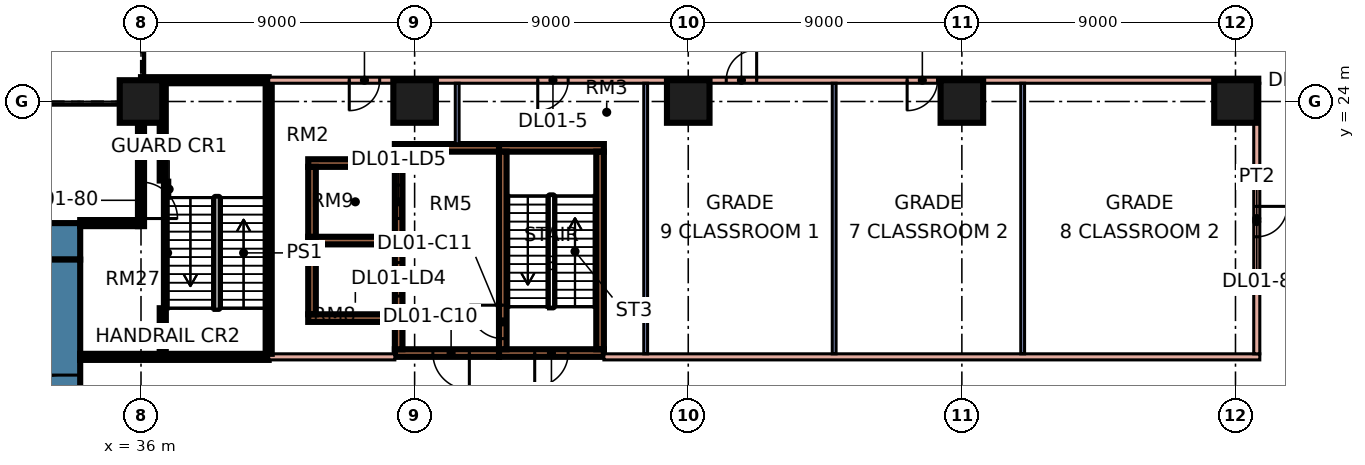
"""IFC4 building model, lengths in metres.
Left out: names, types, materials, properties, quantities, classifications, styles, units other than length and angle.
Written with IfcOpenShell. Run it as: python <this file> out.ifc"""

import sys

from ifc_helpers import new_model, si_unit, direction, frame, frame_2d, origin, origin_2d, place, context, subcontext, project, spatial, rectangle, extrude, element, fill, save


model = new_model("IFC4")
c1 = context("Model", 3, precision=1e-05, world=origin(), true_north=direction((0.0, 1.0)))
c2 = subcontext(c1, "Body", "Model", "MODEL_VIEW")
j1 = project(units=[si_unit("LENGTHUNIT", "METRE"), si_unit("PLANEANGLEUNIT", "RADIAN")], contexts=[c1])
p1 = place(None, origin())
s1 = spatial("IfcSite", under=j1, at=p1, CompositionType="ELEMENT")
p2 = place(p1, origin())
s2 = spatial("IfcBuilding", under=s1, at=p2, CompositionType="ELEMENT")
p3 = place(p2, frame((0.0, 0.0, 7.2)))
s3 = spatial("IfcBuildingStorey", under=s2, at=p3, CompositionType="ELEMENT", Elevation=7.2)
for number, where, z_axis, x_axis in (
    (1, (36.0, 24.0, 0.0), (0.0, 0.0, 1.0), (1.0, 0.0, 0.0)),
    (2, (45.0, 24.0, 0.0), (0.0, 0.0, 1.0), (1.0, 0.0, 0.0)),
    (3, (54.0, 24.0, 0.0), (0.0, 0.0, 1.0), (1.0, 0.0, 0.0)),
    (4, (63.0, 24.0, 0.0), (0.0, 0.0, 1.0), (1.0, 0.0, 0.0)),
    (5, (72.0, 24.0, 0.0), (0.0, 0.0, 1.0), (1.0, 0.0, 0.0)),
):
    element("IfcColumn", number, at=place(p3, frame(where, z_axis=z_axis, x_axis=x_axis)), inside=s3, PredefinedType="COLUMN", context=c2, shape_type="SweptSolid", body=[
        extrude(rectangle(XDim=1.4, YDim=1.4, at=origin_2d()), origin(), (0.0, 0.0, 1.0), 4.8),
    ])
p4 = place(p3, frame((9.0, 19.4, 0.0), z_axis=(0.0, 0.0, 1.0), x_axis=(1.0, 0.0, 0.0)))
e6 = element("IfcWall", 6, at=p4, inside=s3, PredefinedType="SHEAR", context=c2, shape_type="SweptSolid", body=[
    extrude(rectangle(XDim=25.0, YDim=1.2, at=frame_2d((12.5, 0.0))), origin(), (0.0, 0.0, 1.0), 4.8),
])
p5 = place(p4, frame((19.1, 0.0, 0.0)))
e7 = element("IfcOpeningElement", 7, at=p5, cuts=e6, PredefinedType="OPENING", context=c2, shape_type="SweptSolid", body=[
    extrude(rectangle(XDim=1.8, YDim=2.4, at=frame_2d((0.9, 1.2))), frame((0.0, 0.61, 0.0), z_axis=(0.0, -1.0, 0.0), x_axis=(1.0, 0.0, 0.0)), (0.0, 0.0, 1.0), 1.22),
])
p6 = place(p3, frame((33.4, 8.2, 0.0), z_axis=(0.0, 0.0, 1.0), x_axis=(0.0, 1.0, 0.0)))
e8 = element("IfcWall", 8, at=p6, inside=s3, PredefinedType="SHEAR", context=c2, shape_type="SweptSolid", body=[
    extrude(rectangle(XDim=10.6, YDim=1.2, at=frame_2d((5.3, 0.0))), origin(), (0.0, 0.0, 1.0), 4.8),
])
p7 = place(p6, frame((5.0, 0.0, 0.0)))
e9 = element("IfcOpeningElement", 9, at=p7, cuts=e8, PredefinedType="OPENING", context=c2, shape_type="SweptSolid", body=[
    extrude(rectangle(XDim=1.8, YDim=2.4, at=frame_2d((0.9, 1.2))), frame((0.0, 0.61, 0.0), z_axis=(0.0, -1.0, 0.0), x_axis=(1.0, 0.0, 0.0)), (0.0, 0.0, 1.0), 1.22),
])
p8 = place(p3, frame((47.775, 15.725, 0.0), z_axis=(0.0, 0.0, 1.0), x_axis=(1.0, 0.0, 0.0)))
e10 = element("IfcWall", 10, at=p8, inside=s3, PredefinedType="SHEAR", context=c2, shape_type="SweptSolid", body=[
    extrude(rectangle(XDim=3.45, YDim=0.25, at=frame_2d((1.725, 0.0))), origin(), (0.0, 0.0, 1.0), 4.8),
])
p9 = place(p8, frame((1.175, 0.0, 0.0)))
e11 = element("IfcOpeningElement", 11, at=p9, cuts=e10, PredefinedType="OPENING", context=c2, shape_type="SweptSolid", body=[
    extrude(rectangle(XDim=1.1, YDim=2.2, at=frame_2d((0.55, 1.1))), frame((0.0, 0.135, 0.0), z_axis=(0.0, -1.0, 0.0), x_axis=(1.0, 0.0, 0.0)), (0.0, 0.0, 1.0), 0.27),
])
p10 = place(p3, frame((47.775, 22.475, 0.0), z_axis=(0.0, 0.0, 1.0), x_axis=(1.0, 0.0, 0.0)))
e12 = element("IfcWall", 12, at=p10, inside=s3, PredefinedType="SHEAR", context=c2, shape_type="SweptSolid", body=[
    extrude(rectangle(XDim=3.45, YDim=0.25, at=frame_2d((1.725, 0.0))), origin(), (0.0, 0.0, 1.0), 4.8),
])
p11 = place(p3, frame((47.9, 15.85, 0.0), z_axis=(0.0, 0.0, 1.0), x_axis=(0.0, 1.0, 0.0)))
e13 = element("IfcWall", 13, at=p11, inside=s3, PredefinedType="SHEAR", context=c2, shape_type="SweptSolid", body=[
    extrude(rectangle(XDim=6.5, YDim=0.25, at=frame_2d((3.25, 0.0))), origin(), (0.0, 0.0, 1.0), 4.8),
])
p12 = place(p11, frame((0.35, 0.0, 0.0)))
e14 = element("IfcOpeningElement", 14, at=p12, cuts=e13, PredefinedType="OPENING", context=c2, shape_type="SweptSolid", body=[
    extrude(rectangle(XDim=1.1, YDim=2.2, at=frame_2d((0.55, 1.1))), frame((0.0, 0.135, 0.0), z_axis=(0.0, -1.0, 0.0), x_axis=(1.0, 0.0, 0.0)), (0.0, 0.0, 1.0), 0.27),
])
p13 = place(p3, frame((51.1, 15.85, 0.0), z_axis=(0.0, 0.0, 1.0), x_axis=(0.0, 1.0, 0.0)))
e15 = element("IfcWall", 15, at=p13, inside=s3, PredefinedType="SHEAR", context=c2, shape_type="SweptSolid", body=[
    extrude(rectangle(XDim=6.5, YDim=0.25, at=frame_2d((3.25, 0.0))), origin(), (0.0, 0.0, 1.0), 4.8),
])
p14 = place(p3, frame((44.35, 15.725, 0.0), z_axis=(0.0, 0.0, 1.0), x_axis=(1.0, 0.0, 0.0)))
e16 = element("IfcWall", 16, at=p14, inside=s3, PredefinedType="SHEAR", context=c2, shape_type="SweptSolid", body=[
    extrude(rectangle(XDim=3.425, YDim=0.25, at=frame_2d((1.712, 0.0))), origin(), (0.0, 0.0, 1.0), 4.8),
])
p15 = place(p14, frame((1.25, 0.0, 0.0)))
e17 = element("IfcOpeningElement", 17, at=p15, cuts=e16, PredefinedType="OPENING", context=c2, shape_type="SweptSolid", body=[
    extrude(rectangle(XDim=1.2, YDim=2.2, at=frame_2d((0.6, 1.1))), frame((0.0, 0.135, 0.0), z_axis=(0.0, -1.0, 0.0), x_axis=(1.0, 0.0, 0.0)), (0.0, 0.0, 1.0), 0.27),
])
p16 = place(p3, frame((44.35, 22.475, 0.0), z_axis=(0.0, 0.0, 1.0), x_axis=(1.0, 0.0, 0.0)))
e18 = element("IfcWall", 18, at=p16, inside=s3, PredefinedType="SHEAR", context=c2, shape_type="SweptSolid", body=[
    extrude(rectangle(XDim=3.425, YDim=0.25, at=frame_2d((1.712, 0.0))), origin(), (0.0, 0.0, 1.0), 4.8),
])
p17 = place(p3, frame((44.475, 15.85, 0.0), z_axis=(0.0, 0.0, 1.0), x_axis=(0.0, 1.0, 0.0)))
e19 = element("IfcWall", 19, at=p17, inside=s3, PredefinedType="SHEAR", context=c2, shape_type="SweptSolid", body=[
    extrude(rectangle(XDim=6.5, YDim=0.25, at=frame_2d((3.25, 0.0))), origin(), (0.0, 0.0, 1.0), 4.8),
])
p18 = place(p17, frame((1.75, 0.0, 0.0)))
e20 = element("IfcOpeningElement", 20, at=p18, cuts=e19, PredefinedType="OPENING", context=c2, shape_type="SweptSolid", body=[
    extrude(rectangle(XDim=1.1, YDim=2.2, at=frame_2d((0.55, 1.1))), frame((0.0, 0.135, 0.0), z_axis=(0.0, -1.0, 0.0), x_axis=(1.0, 0.0, 0.0)), (0.0, 0.0, 1.0), 0.27),
])
p19 = place(p17, frame((4.3, 0.0, 0.0)))
e21 = element("IfcOpeningElement", 21, at=p19, cuts=e19, PredefinedType="OPENING", context=c2, shape_type="SweptSolid", body=[
    extrude(rectangle(XDim=1.1, YDim=2.2, at=frame_2d((0.55, 1.1))), frame((0.0, 0.135, 0.0), z_axis=(0.0, -1.0, 0.0), x_axis=(1.0, 0.0, 0.0)), (0.0, 0.0, 1.0), 0.27),
])
for number, where, z_axis, x_axis in (
    (22, (41.5, 16.875, 0.0), (0.0, 0.0, 1.0), (1.0, 0.0, 0.0)),
    (23, (41.5, 19.425, 0.0), (0.0, 0.0, 1.0), (1.0, 0.0, 0.0)),
    (24, (41.5, 21.975, 0.0), (0.0, 0.0, 1.0), (1.0, 0.0, 0.0)),
):
    element("IfcWall", number, at=place(p3, frame(where, z_axis=z_axis, x_axis=x_axis)), inside=s3, PredefinedType="SHEAR", context=c2, shape_type="SweptSolid", body=[
        extrude(rectangle(XDim=2.85, YDim=0.25, at=frame_2d((1.425, 0.0))), origin(), (0.0, 0.0, 1.0), 4.8),
    ])
for number, where, z_axis, x_axis in (
    (25, (41.625, 17.0, 0.0), (0.0, 0.0, 1.0), (0.0, 1.0, 0.0)),
    (26, (41.625, 19.55, 0.0), (0.0, 0.0, 1.0), (0.0, 1.0, 0.0)),
):
    element("IfcWall", number, at=place(p3, frame(where, z_axis=z_axis, x_axis=x_axis)), inside=s3, PredefinedType="SHEAR", context=c2, shape_type="SweptSolid", body=[
        extrude(rectangle(XDim=2.3, YDim=0.25, at=frame_2d((1.15, 0.0))), origin(), (0.0, 0.0, 1.0), 4.8),
    ])
p20 = place(p3, frame((34.0, 15.6, 0.0), z_axis=(0.0, 0.0, 1.0), x_axis=(1.0, 0.0, 0.0)))
e27 = element("IfcWall", 27, at=p20, inside=s3, PredefinedType="SOLIDWALL", context=c2, shape_type="SweptSolid", body=[
    extrude(rectangle(XDim=6.2, YDim=0.2, at=frame_2d((3.1, 0.0))), origin(), (0.0, 0.0, 1.0), 4.4),
])
p21 = place(p3, frame((34.0, 20.0, 0.0), z_axis=(0.0, 0.0, 1.0), x_axis=(1.0, 0.0, 0.0)))
e28 = element("IfcWall", 28, at=p21, inside=s3, PredefinedType="SOLIDWALL", context=c2, shape_type="SweptSolid", body=[
    extrude(rectangle(XDim=1.9, YDim=0.2, at=frame_2d((0.95, 0.0))), origin(), (0.0, 0.0, 1.0), 4.4),
])
p22 = place(p3, frame((36.0, 19.9, 0.0), z_axis=(0.0, 0.0, 1.0), x_axis=(0.0, 1.0, 0.0)))
e29 = element("IfcWall", 29, at=p22, inside=s3, PredefinedType="SOLIDWALL", context=c2, shape_type="SweptSolid", body=[
    extrude(rectangle(XDim=4.1, YDim=0.2, at=frame_2d((2.05, 0.0))), origin(), (0.0, 0.0, 1.0), 4.4),
])
p23 = place(p22, frame((0.25, 0.0, 0.0)))
e30 = element("IfcOpeningElement", 30, at=p23, cuts=e29, PredefinedType="OPENING", context=c2, shape_type="SweptSolid", body=[
    extrude(rectangle(XDim=1.2, YDim=2.1, at=frame_2d((0.6, 1.05))), frame((0.0, 0.11, 0.0), z_axis=(0.0, -1.0, 0.0), x_axis=(1.0, 0.0, 0.0)), (0.0, 0.0, 1.0), 0.22),
])
p24 = place(p3, frame((36.0, 24.7, 0.0), z_axis=(0.0, 0.0, 1.0), x_axis=(1.0, 0.0, 0.0)))
e31 = element("IfcWall", 31, at=p24, inside=s3, PredefinedType="SOLIDWALL", context=c2, shape_type="SweptSolid", body=[
    extrude(rectangle(XDim=4.2, YDim=0.2, at=frame_2d((2.1, 0.0))), origin(), (0.0, 0.0, 1.0), 4.4),
])
p25 = place(p3, frame((40.2, 15.6, 0.0), z_axis=(0.0, 0.0, 1.0), x_axis=(1.0, 0.0, 0.0)))
e32 = element("IfcWall", 32, at=p25, inside=s3, PredefinedType="PARTITIONING", context=c2, shape_type="SweptSolid", body=[
    extrude(rectangle(XDim=4.15, YDim=0.2, at=frame_2d((2.075, 0.0))), origin(), (0.0, 0.0, 1.0), 4.4),
])
p26 = place(p3, frame((40.2, 15.7, 0.0), z_axis=(0.0, 0.0, 1.0), x_axis=(0.0, 1.0, 0.0)))
e33 = element("IfcWall", 33, at=p26, inside=s3, PredefinedType="SOLIDWALL", context=c2, shape_type="SweptSolid", body=[
    extrude(rectangle(XDim=8.9, YDim=0.2, at=frame_2d((4.45, 0.0))), origin(), (0.0, 0.0, 1.0), 4.4),
])
p27 = place(p3, frame((40.2, 24.7, 0.0), z_axis=(0.0, 0.0, 1.0), x_axis=(1.0, 0.0, 0.0)))
e34 = element("IfcWall", 34, at=p27, inside=s3, PredefinedType="PARTITIONING", context=c2, shape_type="SweptSolid", body=[
    extrude(rectangle(XDim=32.6, YDim=0.2, at=frame_2d((16.3, 0.0))), origin(), (0.0, 0.0, 1.0), 4.4),
])
p28 = place(p27, frame((2.65, 0.0, 0.0)))
e35 = element("IfcOpeningElement", 35, at=p28, cuts=e34, PredefinedType="OPENING", context=c2, shape_type="SweptSolid", body=[
    extrude(rectangle(XDim=1.0, YDim=2.1, at=frame_2d((0.5, 1.05))), frame((0.0, 0.11, 0.0), z_axis=(0.0, -1.0, 0.0), x_axis=(1.0, 0.0, 0.0)), (0.0, 0.0, 1.0), 0.22),
])
p29 = place(p27, frame((8.85, 0.0, 0.0)))
e36 = element("IfcOpeningElement", 36, at=p29, cuts=e34, PredefinedType="OPENING", context=c2, shape_type="SweptSolid", body=[
    extrude(rectangle(XDim=1.0, YDim=2.1, at=frame_2d((0.5, 1.05))), frame((0.0, 0.11, 0.0), z_axis=(0.0, -1.0, 0.0), x_axis=(1.0, 0.0, 0.0)), (0.0, 0.0, 1.0), 0.22),
])
p30 = place(p27, frame((15.05, 0.0, 0.0)))
e37 = element("IfcOpeningElement", 37, at=p30, cuts=e34, PredefinedType="OPENING", context=c2, shape_type="SweptSolid", body=[
    extrude(rectangle(XDim=1.0, YDim=2.1, at=frame_2d((0.5, 1.05))), frame((0.0, 0.11, 0.0), z_axis=(0.0, -1.0, 0.0), x_axis=(1.0, 0.0, 0.0)), (0.0, 0.0, 1.0), 0.22),
])
p31 = place(p27, frame((21.0, 0.0, 0.0)))
e38 = element("IfcOpeningElement", 38, at=p31, cuts=e34, PredefinedType="OPENING", context=c2, shape_type="SweptSolid", body=[
    extrude(rectangle(XDim=1.0, YDim=2.1, at=frame_2d((0.5, 1.05))), frame((0.0, 0.11, 0.0), z_axis=(0.0, -1.0, 0.0), x_axis=(1.0, 0.0, 0.0)), (0.0, 0.0, 1.0), 0.22),
])
p32 = place(p3, frame((46.4, 22.6, 0.0), z_axis=(0.0, 0.0, 1.0), x_axis=(0.0, 1.0, 0.0)))
e39 = element("IfcWall", 39, at=p32, inside=s3, PredefinedType="PARTITIONING", context=c2, shape_type="SweptSolid", body=[
    extrude(rectangle(XDim=2.0, YDim=0.125, at=frame_2d((1.0, 0.0))), origin(), (0.0, 0.0, 1.0), 4.4),
])
p33 = place(p3, frame((51.225, 15.6, 0.0), z_axis=(0.0, 0.0, 1.0), x_axis=(1.0, 0.0, 0.0)))
e40 = element("IfcWall", 40, at=p33, inside=s3, PredefinedType="PARTITIONING", context=c2, shape_type="SweptSolid", body=[
    extrude(rectangle(XDim=21.575, YDim=0.2, at=frame_2d((10.788, 0.0))), origin(), (0.0, 0.0, 1.0), 4.4),
])
for number, where, z_axis, x_axis in (
    (41, (52.6, 15.7, 0.0), (0.0, 0.0, 1.0), (0.0, 1.0, 0.0)),
    (42, (58.8, 15.7, 0.0), (0.0, 0.0, 1.0), (0.0, 1.0, 0.0)),
    (43, (65.0, 15.7, 0.0), (0.0, 0.0, 1.0), (0.0, 1.0, 0.0)),
):
    element("IfcWall", number, at=place(p3, frame(where, z_axis=z_axis, x_axis=x_axis)), inside=s3, PredefinedType="PARTITIONING", context=c2, shape_type="SweptSolid", body=[
        extrude(rectangle(XDim=8.9, YDim=0.125, at=frame_2d((4.45, 0.0))), origin(), (0.0, 0.0, 1.0), 4.4),
    ])
p34 = place(p3, frame((72.7, 15.7, 0.0), z_axis=(0.0, 0.0, 1.0), x_axis=(0.0, 1.0, 0.0)))
e44 = element("IfcWall", 44, at=p34, inside=s3, PredefinedType="PARTITIONING", context=c2, shape_type="SweptSolid", body=[
    extrude(rectangle(XDim=8.9, YDim=0.2, at=frame_2d((4.45, 0.0))), origin(), (0.0, 0.0, 1.0), 4.4),
])
p35 = place(p34, frame((3.85, 0.0, 0.0)))
e45 = element("IfcOpeningElement", 45, at=p35, cuts=e44, PredefinedType="OPENING", context=c2, shape_type="SweptSolid", body=[
    extrude(rectangle(XDim=1.0, YDim=2.1, at=frame_2d((0.5, 1.05))), frame((0.0, 0.11, 0.0), z_axis=(0.0, -1.0, 0.0), x_axis=(1.0, 0.0, 0.0)), (0.0, 0.0, 1.0), 0.22),
])
p36 = place(p3, frame((36.715, 21.4, 0.0), z_axis=(0.0, 0.0, 1.0), x_axis=(0.0, 1.0, 0.0)))
e46 = element("IfcWall", 46, at=p36, inside=s3, PredefinedType="SOLIDWALL", context=c2, shape_type="SweptSolid", body=[
    extrude(rectangle(XDim=3.2, YDim=0.2, at=frame_2d((1.6, 0.0))), origin(), (0.0, 0.0, 1.0), 4.4),
])
p37 = place(p3, frame((36.715, 15.7, 0.0), z_axis=(0.0, 0.0, 1.0), x_axis=(0.0, 1.0, 0.0)))
e47 = element("IfcWall", 47, at=p37, inside=s3, PredefinedType="SOLIDWALL", context=c2, shape_type="SweptSolid", body=[
    extrude(rectangle(XDim=1.5, YDim=0.2, at=frame_2d((0.75, 0.0))), origin(), (0.0, 0.0, 1.0), 4.4),
])
p38 = place(p7, origin())
e48 = element("IfcDoor", 48, at=p38, inside=s3, OperationType="DOUBLE_DOOR_SINGLE_SWING", PredefinedType="DOOR", context=c2, shape_type="SweptSolid", body=[
    extrude(rectangle(XDim=1.8, YDim=2.4, at=frame_2d((0.9, 1.2))), frame((0.0, 0.025, 0.0), z_axis=(0.0, -1.0, 0.0), x_axis=(1.0, 0.0, 0.0)), (0.0, 0.0, 1.0), 0.05),
])
fill(e9, e48)
p39 = place(p9, frame((1.1, 0.0, 0.0), z_axis=(0.0, 0.0, 1.0), x_axis=(-1.0, 0.0, 0.0)))
e49 = element("IfcDoor", 49, at=p39, inside=s3, OperationType="SINGLE_SWING_LEFT", PredefinedType="DOOR", context=c2, shape_type="SweptSolid", body=[
    extrude(rectangle(XDim=1.1, YDim=2.2, at=frame_2d((0.55, 1.1))), frame((0.0, 0.025, 0.0), z_axis=(0.0, -1.0, 0.0), x_axis=(1.0, 0.0, 0.0)), (0.0, 0.0, 1.0), 0.05),
])
fill(e11, e49)
p40 = place(p15, origin())
e50 = element("IfcDoor", 50, at=p40, inside=s3, OperationType="SINGLE_SWING_RIGHT", PredefinedType="DOOR", context=c2, shape_type="SweptSolid", body=[
    extrude(rectangle(XDim=1.2, YDim=2.2, at=frame_2d((0.6, 1.1))), frame((0.0, 0.025, 0.0), z_axis=(0.0, -1.0, 0.0), x_axis=(1.0, 0.0, 0.0)), (0.0, 0.0, 1.0), 0.05),
])
fill(e17, e50)
p41 = place(p12, frame((1.1, 0.0, 0.0), z_axis=(0.0, 0.0, 1.0), x_axis=(-1.0, 0.0, 0.0)))
e51 = element("IfcDoor", 51, at=p41, inside=s3, OperationType="SINGLE_SWING_RIGHT", PredefinedType="DOOR", context=c2, shape_type="SweptSolid", body=[
    extrude(rectangle(XDim=1.1, YDim=2.2, at=frame_2d((0.55, 1.1))), frame((0.0, 0.025, 0.0), z_axis=(0.0, -1.0, 0.0), x_axis=(1.0, 0.0, 0.0)), (0.0, 0.0, 1.0), 0.05),
])
fill(e14, e51)
p42 = place(p18, origin())
e52 = element("IfcDoor", 52, at=p42, inside=s3, OperationType="DOUBLE_DOOR_SLIDING", PredefinedType="DOOR", context=c2, shape_type="SweptSolid", body=[
    extrude(rectangle(XDim=1.1, YDim=2.2, at=frame_2d((0.55, 1.1))), frame((0.0, 0.025, 0.0), z_axis=(0.0, -1.0, 0.0), x_axis=(1.0, 0.0, 0.0)), (0.0, 0.0, 1.0), 0.05),
])
fill(e20, e52)
p43 = place(p19, origin())
e53 = element("IfcDoor", 53, at=p43, inside=s3, OperationType="DOUBLE_DOOR_SLIDING", PredefinedType="DOOR", context=c2, shape_type="SweptSolid", body=[
    extrude(rectangle(XDim=1.1, YDim=2.2, at=frame_2d((0.55, 1.1))), frame((0.0, 0.025, 0.0), z_axis=(0.0, -1.0, 0.0), x_axis=(1.0, 0.0, 0.0)), (0.0, 0.0, 1.0), 0.05),
])
fill(e21, e53)
p44 = place(p28, frame((1.0, 0.0, 0.0), z_axis=(0.0, 0.0, 1.0), x_axis=(-1.0, 0.0, 0.0)))
e54 = element("IfcDoor", 54, at=p44, inside=s3, OperationType="SINGLE_SWING_LEFT", PredefinedType="DOOR", context=c2, shape_type="SweptSolid", body=[
    extrude(rectangle(XDim=1.0, YDim=2.1, at=frame_2d((0.5, 1.05))), frame((0.0, 0.025, 0.0), z_axis=(0.0, -1.0, 0.0), x_axis=(1.0, 0.0, 0.0)), (0.0, 0.0, 1.0), 0.05),
])
fill(e35, e54)
p45 = place(p29, frame((1.0, 0.0, 0.0), z_axis=(0.0, 0.0, 1.0), x_axis=(-1.0, 0.0, 0.0)))
e55 = element("IfcDoor", 55, at=p45, inside=s3, OperationType="SINGLE_SWING_LEFT", PredefinedType="DOOR", context=c2, shape_type="SweptSolid", body=[
    extrude(rectangle(XDim=1.0, YDim=2.1, at=frame_2d((0.5, 1.05))), frame((0.0, 0.025, 0.0), z_axis=(0.0, -1.0, 0.0), x_axis=(1.0, 0.0, 0.0)), (0.0, 0.0, 1.0), 0.05),
])
fill(e36, e55)
p46 = place(p30, frame((1.0, 0.0, 0.0), z_axis=(0.0, 0.0, 1.0), x_axis=(-1.0, 0.0, 0.0)))
e56 = element("IfcDoor", 56, at=p46, inside=s3, OperationType="SINGLE_SWING_RIGHT", PredefinedType="DOOR", context=c2, shape_type="SweptSolid", body=[
    extrude(rectangle(XDim=1.0, YDim=2.1, at=frame_2d((0.5, 1.05))), frame((0.0, 0.025, 0.0), z_axis=(0.0, -1.0, 0.0), x_axis=(1.0, 0.0, 0.0)), (0.0, 0.0, 1.0), 0.05),
])
fill(e37, e56)
p47 = place(p31, frame((1.0, 0.0, 0.0), z_axis=(0.0, 0.0, 1.0), x_axis=(-1.0, 0.0, 0.0)))
e57 = element("IfcDoor", 57, at=p47, inside=s3, OperationType="SINGLE_SWING_LEFT", PredefinedType="DOOR", context=c2, shape_type="SweptSolid", body=[
    extrude(rectangle(XDim=1.0, YDim=2.1, at=frame_2d((0.5, 1.05))), frame((0.0, 0.025, 0.0), z_axis=(0.0, -1.0, 0.0), x_axis=(1.0, 0.0, 0.0)), (0.0, 0.0, 1.0), 0.05),
])
fill(e38, e57)
p48 = place(p35, origin())
e58 = element("IfcDoor", 58, at=p48, inside=s3, OperationType="SINGLE_SWING_RIGHT", PredefinedType="DOOR", context=c2, shape_type="SweptSolid", body=[
    extrude(rectangle(XDim=1.0, YDim=2.1, at=frame_2d((0.5, 1.05))), frame((0.0, 0.025, 0.0), z_axis=(0.0, -1.0, 0.0), x_axis=(1.0, 0.0, 0.0)), (0.0, 0.0, 1.0), 0.05),
])
fill(e45, e58)
p49 = place(p23, frame((1.2, 0.0, 0.0), z_axis=(0.0, 0.0, 1.0), x_axis=(-1.0, 0.0, 0.0)))
e59 = element("IfcDoor", 59, at=p49, inside=s3, OperationType="SINGLE_SWING_LEFT", PredefinedType="DOOR", context=c2, shape_type="SweptSolid", body=[
    extrude(rectangle(XDim=1.2, YDim=2.1, at=frame_2d((0.6, 1.05))), frame((0.0, 0.025, 0.0), z_axis=(0.0, -1.0, 0.0), x_axis=(1.0, 0.0, 0.0)), (0.0, 0.0, 1.0), 0.05),
])
fill(e30, e59)
save(model, sys.argv[1])
